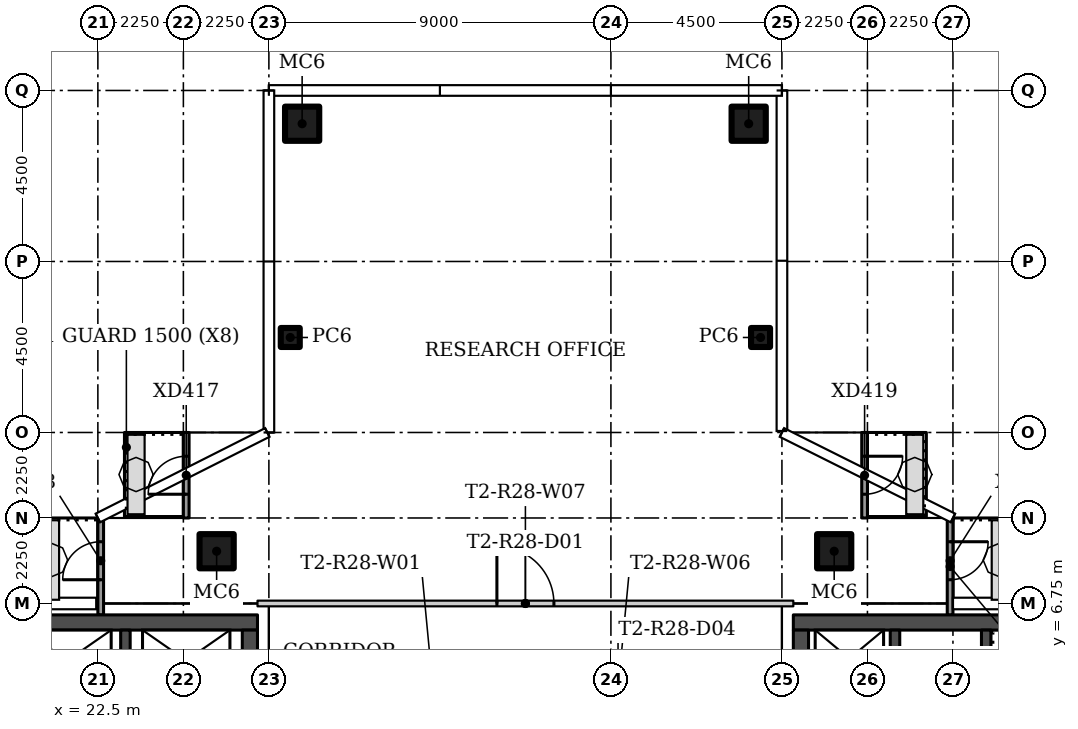
"""IFC4 building model, lengths in metres.
Left out: names, types, materials, properties, quantities, classifications, styles, units other than length and angle.
Written with IfcOpenShell. Run it as: python <this file> out.ifc"""

import sys

from ifc_helpers import new_model, si_unit, direction, frame, frame_2d, origin, origin_2d, place, context, subcontext, project, spatial, rectangle, hollow_rectangle, extrude, element, fill, save


model = new_model("IFC4")
c1 = context("Model", 3, precision=1e-05, world=origin(), true_north=direction((0.0, 1.0)))
c2 = subcontext(c1, "Body", "Model", "MODEL_VIEW")
j1 = project(units=[si_unit("LENGTHUNIT", "METRE"), si_unit("PLANEANGLEUNIT", "RADIAN")], contexts=[c1])
p1 = place(None, origin())
s1 = spatial("IfcSite", under=j1, at=p1, CompositionType="ELEMENT")
p2 = place(p1, origin())
s2 = spatial("IfcBuilding", under=s1, at=p2, CompositionType="ELEMENT")
p3 = place(p2, frame((0.0, 0.0, 257.7)))
s3 = spatial("IfcBuildingStorey", under=s2, at=p3, CompositionType="ELEMENT", Elevation=257.7)
for number, where in (
    (1, (25.625, 8.125, 0.0)),
    (2, (41.875, 8.125, 0.0)),
):
    element("IfcColumn", number, at=place(p3, frame(where)), inside=s3, PredefinedType="COLUMN", context=c2, shape_type="SweptSolid", body=[
        extrude(hollow_rectangle(XDim=0.9, YDim=0.9, WallThickness=0.036, at=origin_2d()), origin(), (0.0, 0.0, 1.0), 3.55),
    ])
p4 = place(p3, frame((39.938, 13.75, 0.0)))
e3 = element("IfcColumn", 3, at=p4, inside=s3, PredefinedType="COLUMN", context=c2, shape_type="SweptSolid", body=[
    extrude(hollow_rectangle(XDim=0.5, YDim=0.5, WallThickness=0.016, at=origin_2d()), origin(), (0.0, 0.0, 1.0), 3.55),
])
p5 = place(p3, frame((39.625, 19.375, 0.0)))
e4 = element("IfcColumn", 4, at=p5, inside=s3, PredefinedType="COLUMN", context=c2, shape_type="SweptSolid", body=[
    extrude(hollow_rectangle(XDim=0.9, YDim=0.9, WallThickness=0.036, at=origin_2d()), origin(), (0.0, 0.0, 1.0), 3.55),
])
p6 = place(p3, frame((27.562, 13.75, 0.0)))
e5 = element("IfcColumn", 5, at=p6, inside=s3, PredefinedType="COLUMN", context=c2, shape_type="SweptSolid", body=[
    extrude(hollow_rectangle(XDim=0.5, YDim=0.5, WallThickness=0.016, at=origin_2d()), origin(), (0.0, 0.0, 1.0), 3.55),
])
p7 = place(p3, frame((27.875, 19.375, 0.0)))
e6 = element("IfcColumn", 6, at=p7, inside=s3, PredefinedType="COLUMN", context=c2, shape_type="SweptSolid", body=[
    extrude(hollow_rectangle(XDim=0.9, YDim=0.9, WallThickness=0.036, at=origin_2d()), origin(), (0.0, 0.0, 1.0), 3.55),
])
p8 = place(p3, frame((26.7, 6.75, 0.0)))
e7 = element("IfcWall", 7, at=p8, inside=s3, PredefinedType="PARTITIONING", context=c2, shape_type="SweptSolid", body=[
    extrude(rectangle(XDim=14.1, YDim=0.15, at=frame_2d((7.05, 0.0))), origin(), (0.0, 0.0, 1.0), 3.55),
])
p9 = place(p8, frame((6.3, 0.0, 0.0)))
e8 = element("IfcOpeningElement", 8, at=p9, cuts=e7, PredefinedType="OPENING", context=c2, shape_type="SweptSolid", body=[
    extrude(rectangle(XDim=1.5, YDim=2.1, at=frame_2d((0.75, 1.05))), frame((0.0, 0.085, 0.0), z_axis=(0.0, -1.0, 0.0), x_axis=(1.0, 0.0, 0.0)), (0.0, 0.0, 1.0), 0.17),
])
p10 = place(p3, frame((24.825, 9.0, 0.0), z_axis=(0.0, 0.0, 1.0), x_axis=(0.0, 1.0, 0.0)))
e9 = element("IfcWall", 9, at=p10, inside=s3, PredefinedType="SOLIDWALL", context=c2, shape_type="SweptSolid", body=[
    extrude(rectangle(XDim=2.25, YDim=0.15, at=frame_2d((1.125, 0.0))), origin(), (0.0, 0.0, 1.0), 3.45),
])
p11 = place(p10, frame((0.625, 0.0, 0.0)))
e10 = element("IfcOpeningElement", 10, at=p11, cuts=e9, PredefinedType="OPENING", context=c2, shape_type="SweptSolid", body=[
    extrude(rectangle(XDim=1.0, YDim=2.4, at=frame_2d((0.5, 1.2))), frame((0.0, 0.085, 0.0), z_axis=(0.0, -1.0, 0.0), x_axis=(1.0, 0.0, 0.0)), (0.0, 0.0, 1.0), 0.17),
])
p12 = place(p3, frame((22.575, 6.448, 0.0), z_axis=(0.0, 0.0, 1.0), x_axis=(0.0, 1.0, 0.0)))
e11 = element("IfcWall", 11, at=p12, inside=s3, PredefinedType="SOLIDWALL", context=c2, shape_type="SweptSolid", body=[
    extrude(rectangle(XDim=2.552, YDim=0.15, at=frame_2d((1.276, 0.0))), origin(), (0.0, 0.0, 1.0), 3.45),
])
p13 = place(p12, frame((0.927, 0.0, 0.0)))
e12 = element("IfcOpeningElement", 12, at=p13, cuts=e11, PredefinedType="OPENING", context=c2, shape_type="SweptSolid", body=[
    extrude(rectangle(XDim=1.0, YDim=2.4, at=frame_2d((0.5, 1.2))), frame((0.0, 0.085, 0.0), z_axis=(0.0, -1.0, 0.0), x_axis=(1.0, 0.0, 0.0)), (0.0, 0.0, 1.0), 0.17),
])
p14 = place(p3, frame((42.675, 11.25, 0.0), z_axis=(0.0, 0.0, 1.0), x_axis=(0.0, -1.0, 0.0)))
e13 = element("IfcWall", 13, at=p14, inside=s3, PredefinedType="SOLIDWALL", context=c2, shape_type="SweptSolid", body=[
    extrude(rectangle(XDim=2.25, YDim=0.15, at=frame_2d((1.125, 0.0))), origin(), (0.0, 0.0, 1.0), 3.45),
])
p15 = place(p14, frame((0.625, 0.0, 0.0)))
e14 = element("IfcOpeningElement", 14, at=p15, cuts=e13, PredefinedType="OPENING", context=c2, shape_type="SweptSolid", body=[
    extrude(rectangle(XDim=1.0, YDim=2.4, at=frame_2d((0.5, 1.2))), frame((0.0, 0.085, 0.0), z_axis=(0.0, -1.0, 0.0), x_axis=(1.0, 0.0, 0.0)), (0.0, 0.0, 1.0), 0.17),
])
p16 = place(p3, frame((44.925, 9.0, 0.0), z_axis=(0.0, 0.0, 1.0), x_axis=(0.0, -1.0, 0.0)))
e15 = element("IfcWall", 15, at=p16, inside=s3, PredefinedType="SOLIDWALL", context=c2, shape_type="SweptSolid", body=[
    extrude(rectangle(XDim=2.557, YDim=0.15, at=frame_2d((1.278, 0.0))), origin(), (0.0, 0.0, 1.0), 3.45),
])
p17 = place(p16, frame((0.625, 0.0, 0.0)))
e16 = element("IfcOpeningElement", 16, at=p17, cuts=e15, PredefinedType="OPENING", context=c2, shape_type="SweptSolid", body=[
    extrude(rectangle(XDim=1.0, YDim=2.4, at=frame_2d((0.5, 1.2))), frame((0.0, 0.085, 0.0), z_axis=(0.0, -1.0, 0.0), x_axis=(1.0, 0.0, 0.0)), (0.0, 0.0, 1.0), 0.17),
])
p18 = place(p3, frame((13.8, 6.25, 0.0)))
e17 = element("IfcWall", 17, at=p18, inside=s3, PredefinedType="SHEAR", context=c2, shape_type="SweptSolid", body=[
    extrude(rectangle(XDim=12.9, YDim=0.4, at=frame_2d((6.45, 0.0))), origin(), (0.0, 0.0, 1.0), 3.55),
])
p19 = place(p3, frame((26.5, 6.05, 0.0), z_axis=(0.0, 0.0, 1.0), x_axis=(0.0, -1.0, 0.0)))
e18 = element("IfcWall", 18, at=p19, inside=s3, PredefinedType="SHEAR", context=c2, shape_type="SweptSolid", body=[
    extrude(rectangle(XDim=12.1, YDim=0.4, at=frame_2d((6.05, 0.0))), origin(), (0.0, 0.0, 1.0), 3.55),
])
p20 = place(p19, frame((10.1, 0.0, 0.0)))
e19 = element("IfcOpeningElement", 19, at=p20, cuts=e18, PredefinedType="OPENING", context=c2, shape_type="SweptSolid", body=[
    extrude(rectangle(XDim=1.2, YDim=2.1, at=frame_2d((0.6, 1.05))), frame((0.0, 0.21, 0.0), z_axis=(0.0, -1.0, 0.0), x_axis=(1.0, 0.0, 0.0)), (0.0, 0.0, 1.0), 0.42),
])
p21 = place(p19, frame((3.9, 0.0, 0.0)))
e20 = element("IfcOpeningElement", 20, at=p21, cuts=e18, PredefinedType="OPENING", context=c2, shape_type="SweptSolid", body=[
    extrude(rectangle(XDim=1.8, YDim=2.4, at=frame_2d((0.9, 1.2))), frame((0.0, 0.21, 0.0), z_axis=(0.0, -1.0, 0.0), x_axis=(1.0, 0.0, 0.0)), (0.0, 0.0, 1.0), 0.42),
])
p22 = place(p3, frame((23.225, 3.25, 0.0), z_axis=(0.0, 0.0, 1.0), x_axis=(0.0, 1.0, 0.0)))
e21 = element("IfcWall", 21, at=p22, inside=s3, PredefinedType="SHEAR", context=c2, shape_type="SweptSolid", body=[
    extrude(rectangle(XDim=2.8, YDim=0.25, at=frame_2d((1.4, 0.0))), origin(), (0.0, 0.0, 1.0), 3.55),
])
p23 = place(p3, frame((53.7, 6.25, 0.0), z_axis=(0.0, 0.0, 1.0), x_axis=(-1.0, 0.0, 0.0)))
e22 = element("IfcWall", 22, at=p23, inside=s3, PredefinedType="SHEAR", context=c2, shape_type="SweptSolid", body=[
    extrude(rectangle(XDim=12.9, YDim=0.4, at=frame_2d((6.45, 0.0))), origin(), (0.0, 0.0, 1.0), 3.55),
])
p24 = place(p3, frame((41.0, -6.05, 0.0), z_axis=(0.0, 0.0, 1.0), x_axis=(0.0, 1.0, 0.0)))
e23 = element("IfcWall", 23, at=p24, inside=s3, PredefinedType="SHEAR", context=c2, shape_type="SweptSolid", body=[
    extrude(rectangle(XDim=12.1, YDim=0.4, at=frame_2d((6.05, 0.0))), origin(), (0.0, 0.0, 1.0), 3.55),
])
p25 = place(p24, frame((0.8, 0.0, 0.0)))
e24 = element("IfcOpeningElement", 24, at=p25, cuts=e23, PredefinedType="OPENING", context=c2, shape_type="SweptSolid", body=[
    extrude(rectangle(XDim=1.2, YDim=2.1, at=frame_2d((0.6, 1.05))), frame((0.0, 0.21, 0.0), z_axis=(0.0, -1.0, 0.0), x_axis=(1.0, 0.0, 0.0)), (0.0, 0.0, 1.0), 0.42),
])
p26 = place(p24, frame((6.4, 0.0, 0.0)))
e25 = element("IfcOpeningElement", 25, at=p26, cuts=e23, PredefinedType="OPENING", context=c2, shape_type="SweptSolid", body=[
    extrude(rectangle(XDim=1.8, YDim=2.4, at=frame_2d((0.9, 1.2))), frame((0.0, 0.21, 0.0), z_axis=(0.0, -1.0, 0.0), x_axis=(1.0, 0.0, 0.0)), (0.0, 0.0, 1.0), 0.42),
])
for number, where, z_axis, x_axis in (
    (26, (45.875, 3.25, 0.0), (0.0, 0.0, 1.0), (0.0, 1.0, 0.0)),
    (27, (43.475, 3.25, 0.0), (0.0, 0.0, 1.0), (0.0, 1.0, 0.0)),
):
    element("IfcWall", number, at=place(p3, frame(where, z_axis=z_axis, x_axis=x_axis)), inside=s3, PredefinedType="SHEAR", context=c2, shape_type="SweptSolid", body=[
        extrude(rectangle(XDim=2.8, YDim=0.25, at=frame_2d((1.4, 0.0))), origin(), (0.0, 0.0, 1.0), 3.55),
    ])
p27 = place(p9, origin())
e28 = element("IfcDoor", 28, at=p27, inside=s3, OperationType="DOUBLE_DOOR_SINGLE_SWING", PredefinedType="DOOR", context=c2, shape_type="SweptSolid", body=[
    extrude(rectangle(XDim=1.5, YDim=2.1, at=frame_2d((0.75, 1.05))), frame((0.0, 0.025, 0.0), z_axis=(0.0, -1.0, 0.0), x_axis=(1.0, 0.0, 0.0)), (0.0, 0.0, 1.0), 0.05),
])
fill(e8, e28)
p28 = place(p11, origin())
e29 = element("IfcDoor", 29, at=p28, inside=s3, OperationType="SINGLE_SWING_RIGHT", PredefinedType="DOOR", context=c2, shape_type="SweptSolid", body=[
    extrude(rectangle(XDim=1.0, YDim=2.4, at=frame_2d((0.5, 1.2))), frame((0.0, 0.025, 0.0), z_axis=(0.0, -1.0, 0.0), x_axis=(1.0, 0.0, 0.0)), (0.0, 0.0, 1.0), 0.05),
])
fill(e10, e29)
p29 = place(p13, origin())
e30 = element("IfcDoor", 30, at=p29, inside=s3, OperationType="SINGLE_SWING_LEFT", PredefinedType="DOOR", context=c2, shape_type="SweptSolid", body=[
    extrude(rectangle(XDim=1.0, YDim=2.4, at=frame_2d((0.5, 1.2))), frame((0.0, 0.025, 0.0), z_axis=(0.0, -1.0, 0.0), x_axis=(1.0, 0.0, 0.0)), (0.0, 0.0, 1.0), 0.05),
])
fill(e12, e30)
p30 = place(p15, origin())
e31 = element("IfcDoor", 31, at=p30, inside=s3, OperationType="SINGLE_SWING_RIGHT", PredefinedType="DOOR", context=c2, shape_type="SweptSolid", body=[
    extrude(rectangle(XDim=1.0, YDim=2.4, at=frame_2d((0.5, 1.2))), frame((0.0, 0.025, 0.0), z_axis=(0.0, -1.0, 0.0), x_axis=(1.0, 0.0, 0.0)), (0.0, 0.0, 1.0), 0.05),
])
fill(e14, e31)
p31 = place(p17, origin())
e32 = element("IfcDoor", 32, at=p31, inside=s3, OperationType="SINGLE_SWING_LEFT", PredefinedType="DOOR", context=c2, shape_type="SweptSolid", body=[
    extrude(rectangle(XDim=1.0, YDim=2.4, at=frame_2d((0.5, 1.2))), frame((0.0, 0.025, 0.0), z_axis=(0.0, -1.0, 0.0), x_axis=(1.0, 0.0, 0.0)), (0.0, 0.0, 1.0), 0.05),
])
fill(e16, e32)
save(model, sys.argv[1])
